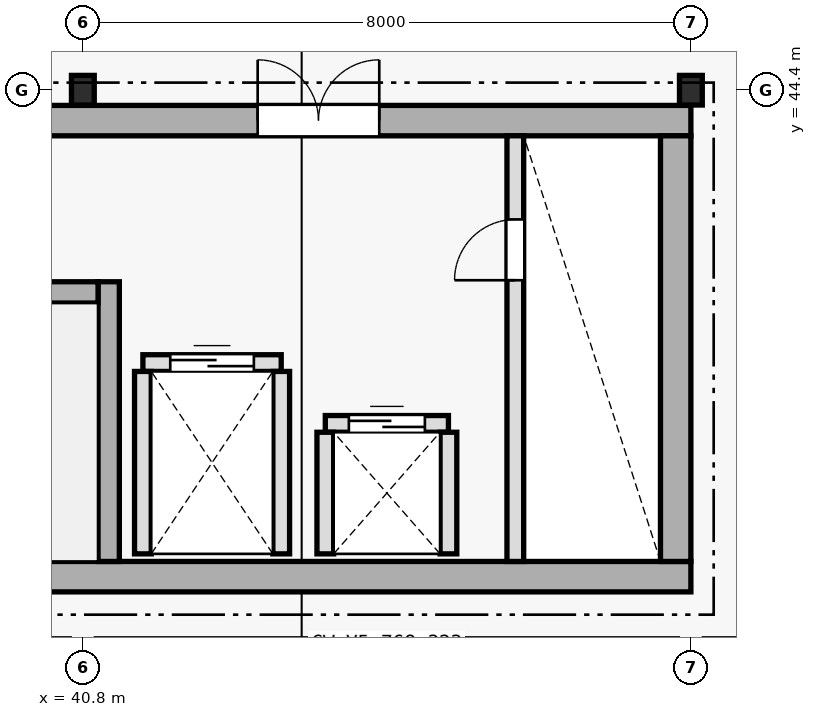
"""IFC4 building model, lengths in metres.
Left out: names, types, materials, properties, quantities, classifications, styles, units other than length and angle.
Written with IfcOpenShell. Run it as: python <this file> out.ifc"""

import sys

from ifc_helpers import new_model, si_unit, direction, frame, frame_2d, origin, origin_2d, place, context, subcontext, project, spatial, rectangle, i_section, extrude, element, fill, save


model = new_model("IFC4")
c1 = context("Model", 3, precision=1e-05, world=origin(), true_north=direction((0.0, 1.0)))
c2 = subcontext(c1, "Body", "Model", "MODEL_VIEW")
j1 = project(units=[si_unit("LENGTHUNIT", "METRE"), si_unit("PLANEANGLEUNIT", "RADIAN")], contexts=[c1])
p1 = place(None, origin())
s1 = spatial("IfcSite", under=j1, at=p1, CompositionType="ELEMENT")
p2 = place(p1, origin())
s2 = spatial("IfcBuilding", under=s1, at=p2, CompositionType="ELEMENT")
p3 = place(p2, frame((0.0, 0.0, 27.2)))
s3 = spatial("IfcBuildingStorey", under=s2, at=p3, CompositionType="ELEMENT", Elevation=27.2)
p4 = place(p3, frame((32.8, 38.0, 0.0), z_axis=(0.0, 0.0, 1.0), x_axis=(1.0, 0.0, 0.0)))
e1 = element("IfcWall", 1, at=p4, inside=s3, PredefinedType="SHEAR", context=c2, shape_type="SweptSolid", body=[
    extrude(rectangle(XDim=16.0, YDim=0.4, at=frame_2d((8.0, 0.0))), origin(), (0.0, 0.0, 1.0), 3.895),
])
p5 = place(p3, frame((32.8, 44.0, 0.0), z_axis=(0.0, 0.0, 1.0), x_axis=(1.0, 0.0, 0.0)))
e2 = element("IfcWall", 2, at=p5, inside=s3, PredefinedType="SHEAR", context=c2, shape_type="SweptSolid", body=[
    extrude(rectangle(XDim=16.0, YDim=0.4, at=frame_2d((8.0, 0.0))), origin(), (0.0, 0.0, 1.0), 3.895),
])
p6 = place(p5, frame((10.3, 0.0, 0.0)))
e3 = element("IfcOpeningElement", 3, at=p6, cuts=e2, PredefinedType="OPENING", context=c2, shape_type="SweptSolid", body=[
    extrude(rectangle(XDim=1.6, YDim=2.2, at=frame_2d((0.8, 1.1))), frame((0.0, 0.21, 0.0), z_axis=(0.0, -1.0, 0.0), x_axis=(1.0, 0.0, 0.0)), (0.0, 0.0, 1.0), 0.42),
])
p7 = place(p3, frame((48.6, 38.2, 0.0), z_axis=(0.0, 0.0, 1.0), x_axis=(0.0, 1.0, 0.0)))
e4 = element("IfcWall", 4, at=p7, inside=s3, PredefinedType="SHEAR", context=c2, shape_type="SweptSolid", body=[
    extrude(rectangle(XDim=5.6, YDim=0.4, at=frame_2d((2.8, 0.0))), origin(), (0.0, 0.0, 1.0), 3.895),
])
p8 = place(p3, frame((41.14, 38.2, 0.0), z_axis=(0.0, 0.0, 1.0), x_axis=(0.0, 1.0, 0.0)))
e5 = element("IfcWall", 5, at=p8, inside=s3, PredefinedType="SHEAR", context=c2, shape_type="SweptSolid", body=[
    extrude(rectangle(XDim=3.68, YDim=0.28, at=frame_2d((1.84, 0.0))), origin(), (0.0, 0.0, 1.0), 3.895),
])
p9 = place(p3, frame((33.2, 41.74, 0.0), z_axis=(0.0, 0.0, 1.0), x_axis=(1.0, 0.0, 0.0)))
e6 = element("IfcWall", 6, at=p9, inside=s3, PredefinedType="SHEAR", context=c2, shape_type="SweptSolid", body=[
    extrude(rectangle(XDim=7.8, YDim=0.28, at=frame_2d((3.9, 0.0))), origin(), (0.0, 0.0, 1.0), 3.895),
])
p10 = place(p9, frame((0.2, 0.0, 0.0)))
e7 = element("IfcOpeningElement", 7, at=p10, cuts=e6, PredefinedType="OPENING", context=c2, shape_type="SweptSolid", body=[
    extrude(rectangle(XDim=1.3, YDim=2.2, at=frame_2d((0.65, 1.1))), frame((0.0, 0.15, 0.0), z_axis=(0.0, -1.0, 0.0), x_axis=(1.0, 0.0, 0.0)), (0.0, 0.0, 1.0), 0.3),
])
for number, where, z_axis, x_axis in (
    (8, (40.8, 44.4, 0.0), (0.0, 0.0, 1.0), (1.0, 0.0, 0.0)),
    (9, (48.8, 44.4, 0.0), (0.0, 0.0, 1.0), (1.0, 0.0, 0.0)),
):
    element("IfcColumn", number, at=place(p3, frame(where, z_axis=z_axis, x_axis=x_axis)), inside=s3, PredefinedType="COLUMN", context=c2, shape_type="SweptSolid", body=[
        extrude(i_section(OverallWidth=0.3, OverallDepth=0.39, WebThickness=0.011, FlangeThickness=0.019, FilletRadius=0.027, at=origin_2d()), origin(), (0.0, 0.0, 1.0), 3.9),
    ])
p11 = place(p3, frame((41.59, 40.81, 0.0), z_axis=(0.0, 0.0, 1.0), x_axis=(1.0, 0.0, 0.0)))
e10 = element("IfcWall", 10, at=p11, inside=s3, PredefinedType="PLUMBINGWALL", context=c2, shape_type="SweptSolid", body=[
    extrude(rectangle(XDim=1.82, YDim=0.22, at=frame_2d((0.91, 0.0))), origin(), (0.0, 0.0, 1.0), 3.68),
])
p12 = place(p11, frame((0.36, 0.0, 0.0)))
e11 = element("IfcOpeningElement", 11, at=p12, cuts=e10, PredefinedType="OPENING", context=c2, shape_type="SweptSolid", body=[
    extrude(rectangle(XDim=1.1, YDim=2.2, at=frame_2d((0.55, 1.1))), frame((0.0, 0.12, 0.0), z_axis=(0.0, -1.0, 0.0), x_axis=(1.0, 0.0, 0.0)), (0.0, 0.0, 1.0), 0.24),
])
for number, where, z_axis, x_axis in (
    (12, (41.59, 38.3, 0.0), (0.0, 0.0, 1.0), (0.0, 1.0, 0.0)),
    (13, (43.41, 38.3, 0.0), (0.0, 0.0, 1.0), (0.0, 1.0, 0.0)),
):
    element("IfcWall", number, at=place(p3, frame(where, z_axis=z_axis, x_axis=x_axis)), inside=s3, PredefinedType="PLUMBINGWALL", context=c2, shape_type="SweptSolid", body=[
        extrude(rectangle(XDim=2.4, YDim=0.22, at=frame_2d((1.2, 0.0))), origin(), (0.0, 0.0, 1.0), 3.68),
    ])
p13 = place(p3, frame((43.99, 40.01, 0.0), z_axis=(0.0, 0.0, 1.0), x_axis=(1.0, 0.0, 0.0)))
e14 = element("IfcWall", 14, at=p13, inside=s3, PredefinedType="PLUMBINGWALL", context=c2, shape_type="SweptSolid", body=[
    extrude(rectangle(XDim=1.62, YDim=0.22, at=frame_2d((0.81, 0.0))), origin(), (0.0, 0.0, 1.0), 3.68),
])
p14 = place(p13, frame((0.31, 0.0, 0.0)))
e15 = element("IfcOpeningElement", 15, at=p14, cuts=e14, PredefinedType="OPENING", context=c2, shape_type="SweptSolid", body=[
    extrude(rectangle(XDim=1.0, YDim=2.2, at=frame_2d((0.5, 1.1))), frame((0.0, 0.12, 0.0), z_axis=(0.0, -1.0, 0.0), x_axis=(1.0, 0.0, 0.0)), (0.0, 0.0, 1.0), 0.24),
])
for number, where, z_axis, x_axis in (
    (16, (43.99, 38.3, 0.0), (0.0, 0.0, 1.0), (0.0, 1.0, 0.0)),
    (17, (45.61, 38.3, 0.0), (0.0, 0.0, 1.0), (0.0, 1.0, 0.0)),
):
    element("IfcWall", number, at=place(p3, frame(where, z_axis=z_axis, x_axis=x_axis)), inside=s3, PredefinedType="PLUMBINGWALL", context=c2, shape_type="SweptSolid", body=[
        extrude(rectangle(XDim=1.6, YDim=0.22, at=frame_2d((0.8, 0.0))), origin(), (0.0, 0.0, 1.0), 3.68),
    ])
p15 = place(p3, frame((46.49, 38.2, 0.0), z_axis=(0.0, 0.0, 1.0), x_axis=(0.0, 1.0, 0.0)))
e18 = element("IfcWall", 18, at=p15, inside=s3, PredefinedType="PLUMBINGWALL", context=c2, shape_type="SweptSolid", body=[
    extrude(rectangle(XDim=5.6, YDim=0.22, at=frame_2d((2.8, 0.0))), origin(), (0.0, 0.0, 1.0), 3.68),
])
p16 = place(p15, frame((3.7, 0.0, 0.0)))
e19 = element("IfcOpeningElement", 19, at=p16, cuts=e18, PredefinedType="OPENING", context=c2, shape_type="SweptSolid", body=[
    extrude(rectangle(XDim=0.8, YDim=2.1, at=frame_2d((0.4, 1.05))), frame((0.0, 0.12, 0.0), z_axis=(0.0, -1.0, 0.0), x_axis=(1.0, 0.0, 0.0)), (0.0, 0.0, 1.0), 0.24),
])
p17 = place(p12, origin())
e20 = element("IfcDoor", 20, at=p17, inside=s3, OperationType="DOUBLE_DOOR_SLIDING", PredefinedType="DOOR", context=c2, shape_type="SweptSolid", body=[
    extrude(rectangle(XDim=1.1, YDim=2.2, at=frame_2d((0.55, 1.1))), frame((0.0, 0.025, 0.0), z_axis=(0.0, -1.0, 0.0), x_axis=(1.0, 0.0, 0.0)), (0.0, 0.0, 1.0), 0.05),
])
fill(e11, e20)
p18 = place(p14, origin())
e21 = element("IfcDoor", 21, at=p18, inside=s3, OperationType="DOUBLE_DOOR_SLIDING", PredefinedType="DOOR", context=c2, shape_type="SweptSolid", body=[
    extrude(rectangle(XDim=1.0, YDim=2.2, at=frame_2d((0.5, 1.1))), frame((0.0, 0.025, 0.0), z_axis=(0.0, -1.0, 0.0), x_axis=(1.0, 0.0, 0.0)), (0.0, 0.0, 1.0), 0.05),
])
fill(e15, e21)
p19 = place(p16, origin())
e22 = element("IfcDoor", 22, at=p19, inside=s3, OperationType="SINGLE_SWING_LEFT", PredefinedType="DOOR", context=c2, shape_type="SweptSolid", body=[
    extrude(rectangle(XDim=0.8, YDim=2.1, at=frame_2d((0.4, 1.05))), frame((0.0, 0.025, 0.0), z_axis=(0.0, -1.0, 0.0), x_axis=(1.0, 0.0, 0.0)), (0.0, 0.0, 1.0), 0.05),
])
fill(e19, e22)
p20 = place(p6, origin())
e23 = element("IfcDoor", 23, at=p20, inside=s3, OperationType="DOUBLE_DOOR_SINGLE_SWING", PredefinedType="DOOR", context=c2, shape_type="SweptSolid", body=[
    extrude(rectangle(XDim=1.6, YDim=2.2, at=frame_2d((0.8, 1.1))), frame((0.0, 0.025, 0.0), z_axis=(0.0, -1.0, 0.0), x_axis=(1.0, 0.0, 0.0)), (0.0, 0.0, 1.0), 0.05),
])
fill(e3, e23)
save(model, sys.argv[1])
